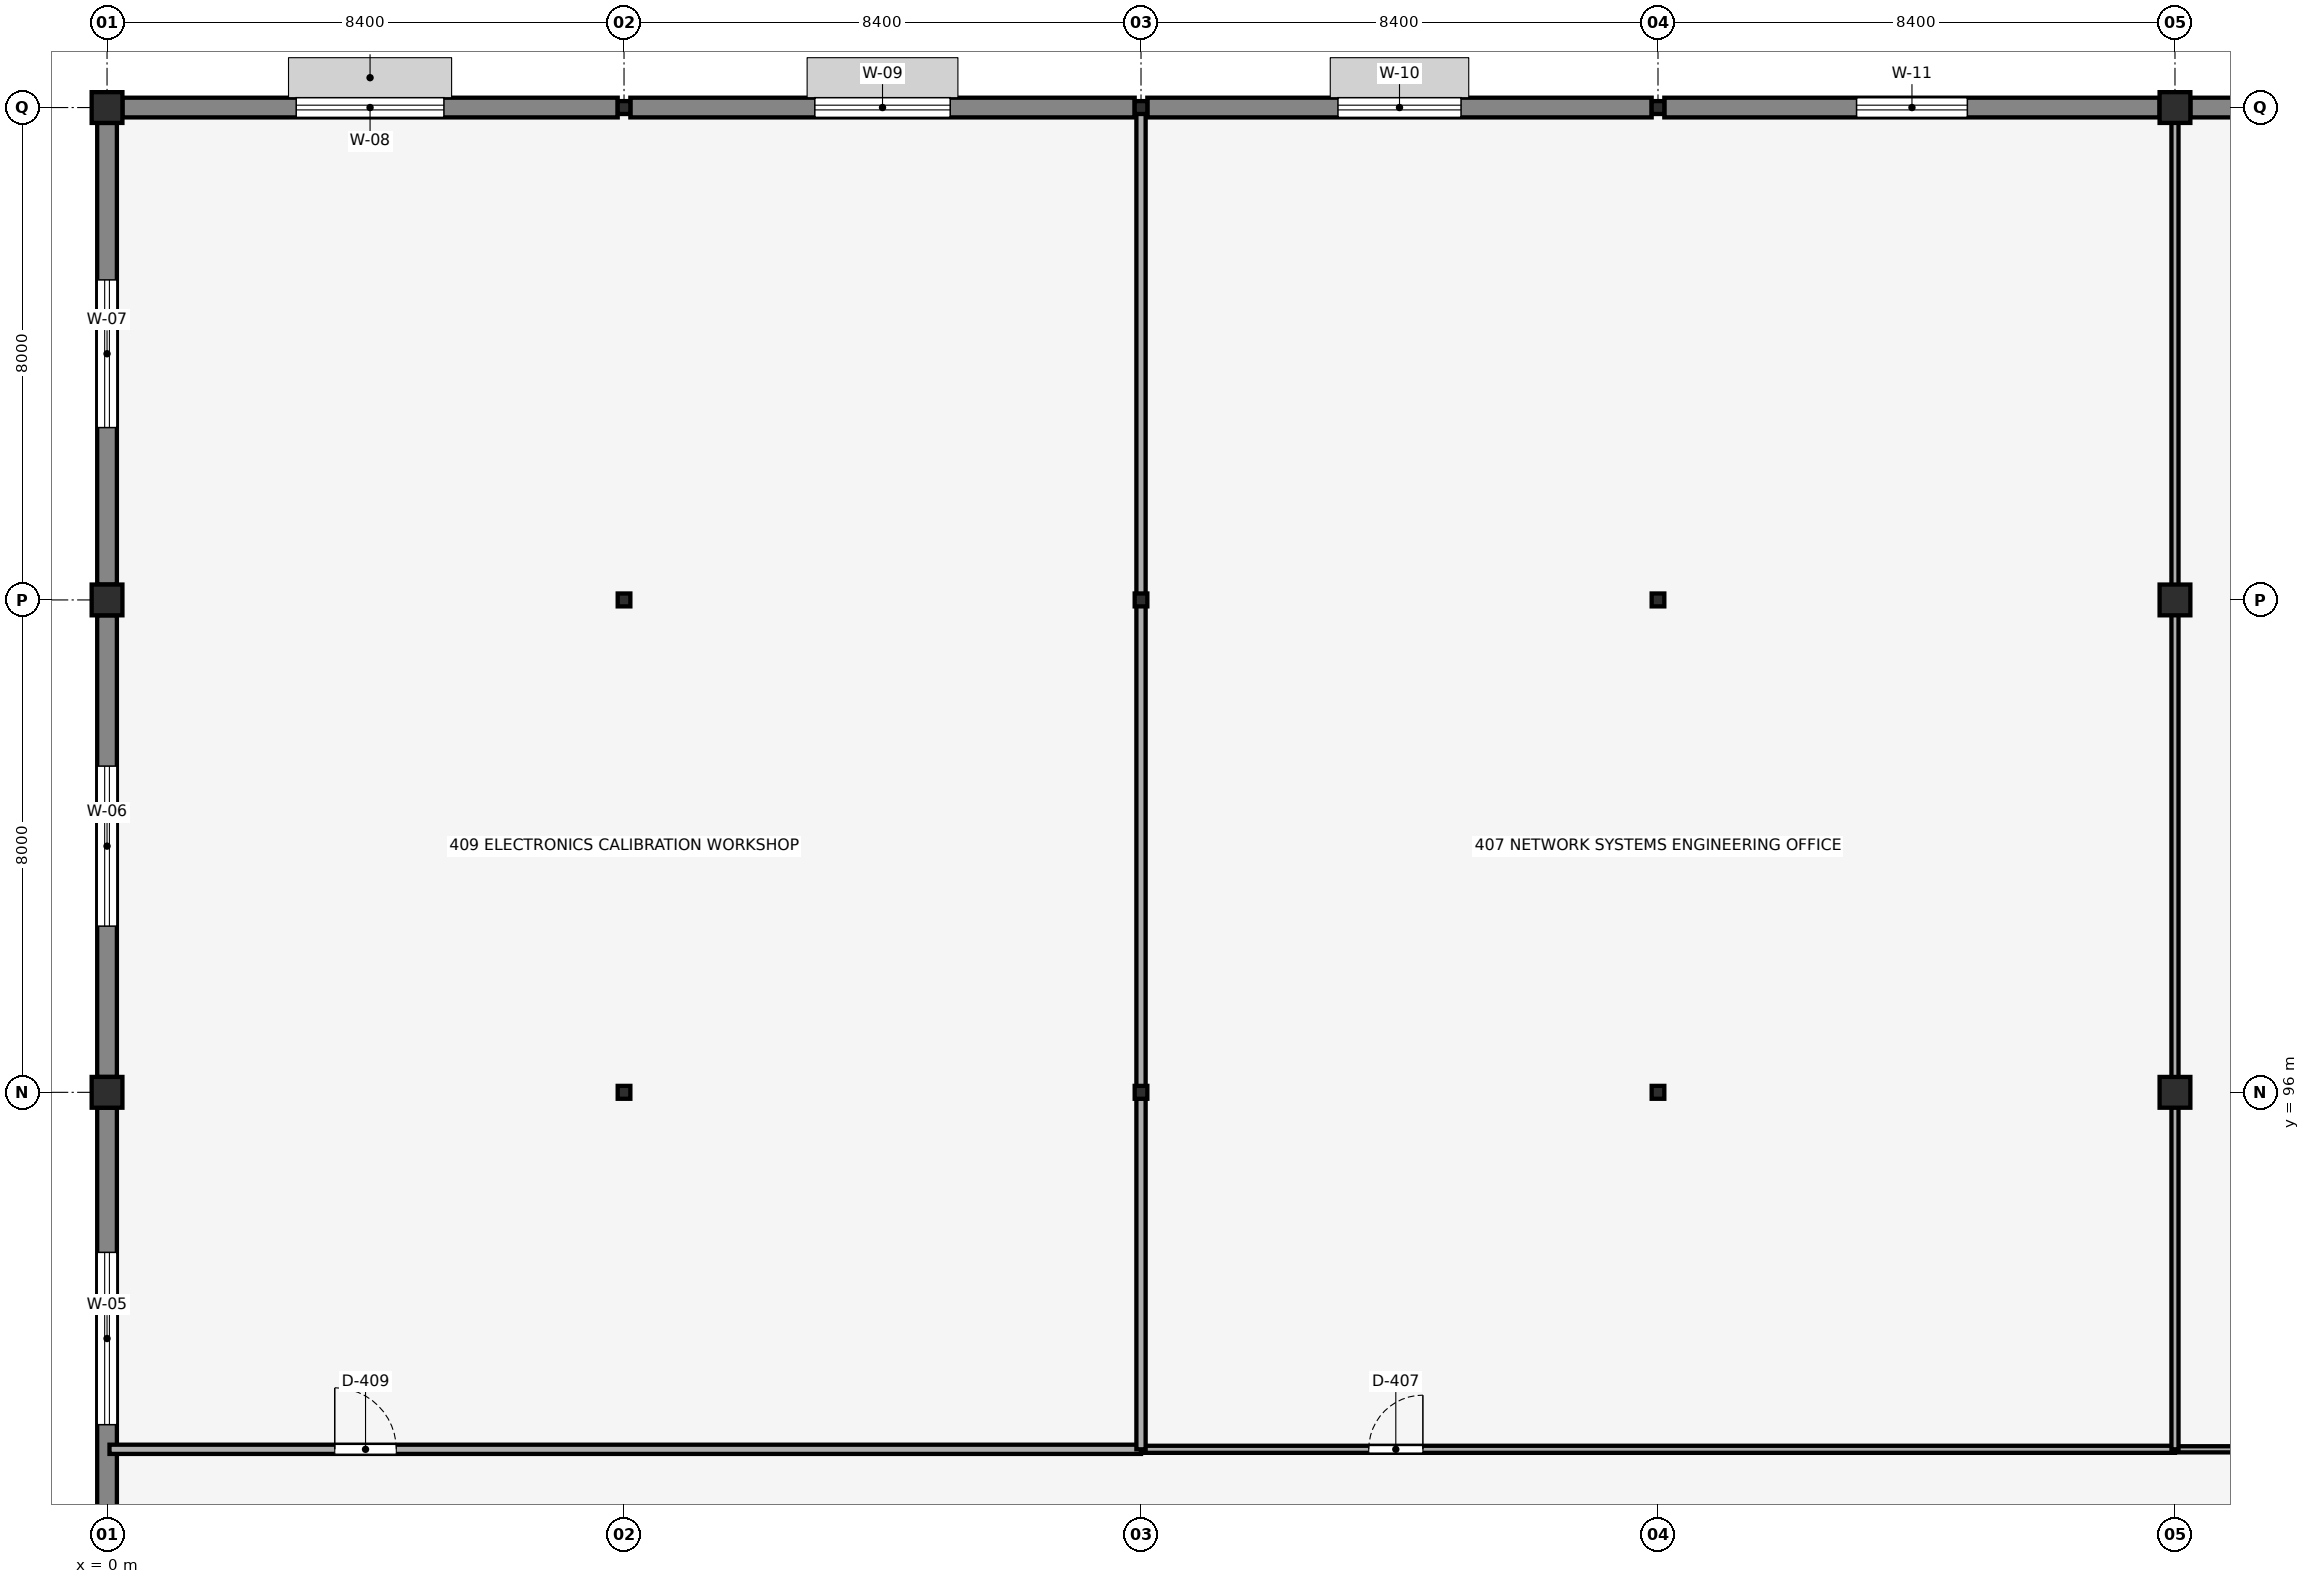
"""IFC4 building model, lengths in metres.
Left out: names, types, materials, properties, quantities, classifications, styles, units other than length and angle.
Written with IfcOpenShell. Run it as: python <this file> out.ifc"""

import sys

from ifc_helpers import new_model, si_unit, direction, frame, frame_2d, origin, origin_2d, place, context, subcontext, project, spatial, rectangle, i_section, extrude, element, fill, save


model = new_model("IFC4")
c1 = context("Model", 3, precision=1e-05, world=origin(), true_north=direction((0.0, 1.0)))
c2 = subcontext(c1, "Body", "Model", "MODEL_VIEW")
j1 = project(units=[si_unit("LENGTHUNIT", "METRE"), si_unit("PLANEANGLEUNIT", "RADIAN")], contexts=[c1])
p1 = place(None, origin())
s1 = spatial("IfcSite", under=j1, at=p1, CompositionType="ELEMENT")
p2 = place(p1, origin())
s2 = spatial("IfcBuilding", under=s1, at=p2, CompositionType="ELEMENT")
p3 = place(p2, frame((0.0, 0.0, 17.2)))
s3 = spatial("IfcBuildingStorey", under=s2, at=p3, CompositionType="ELEMENT", Elevation=17.2)
for number, where, z_axis, x_axis in (
    (1, (0.0, 96.0, 0.0), (0.0, 0.0, 1.0), (1.0, 0.0, 0.0)),
    (2, (0.0, 104.0, 0.0), (0.0, 0.0, 1.0), (1.0, 0.0, 0.0)),
    (3, (0.0, 112.0, 0.0), (0.0, 0.0, 1.0), (1.0, 0.0, 0.0)),
):
    element("IfcColumn", number, at=place(p3, frame(where, z_axis=z_axis, x_axis=x_axis)), inside=s3, PredefinedType="COLUMN", context=c2, shape_type="SweptSolid", body=[
        extrude(rectangle(XDim=0.5, YDim=0.5, at=origin_2d()), origin(), (0.0, 0.0, 1.0), 3.59),
    ])
for number, where, z_axis, x_axis in (
    (4, (8.4, 96.0, 0.0), (0.0, 0.0, 1.0), (1.0, 0.0, 0.0)),
    (5, (8.4, 104.0, 0.0), (0.0, 0.0, 1.0), (1.0, 0.0, 0.0)),
    (6, (8.4, 112.0, 0.0), (0.0, 0.0, 1.0), (1.0, 0.0, 0.0)),
    (7, (16.8, 96.0, 0.0), (0.0, 0.0, 1.0), (1.0, 0.0, 0.0)),
    (8, (16.8, 104.0, 0.0), (0.0, 0.0, 1.0), (1.0, 0.0, 0.0)),
    (9, (16.8, 112.0, 0.0), (0.0, 0.0, 1.0), (1.0, 0.0, 0.0)),
    (10, (25.2, 96.0, 0.0), (0.0, 0.0, 1.0), (1.0, 0.0, 0.0)),
    (11, (25.2, 104.0, 0.0), (0.0, 0.0, 1.0), (1.0, 0.0, 0.0)),
    (12, (25.2, 112.0, 0.0), (0.0, 0.0, 1.0), (1.0, 0.0, 0.0)),
):
    element("IfcColumn", number, at=place(p3, frame(where, z_axis=z_axis, x_axis=x_axis)), inside=s3, PredefinedType="COLUMN", context=c2, shape_type="SweptSolid", body=[
        extrude(i_section(OverallWidth=0.206, OverallDepth=0.21, WebThickness=0.01, FlangeThickness=0.014, FilletRadius=0.01, at=origin_2d()), origin(), (0.0, 0.0, 1.0), 3.59),
    ])
for number, where, z_axis, x_axis in (
    (13, (33.6, 96.0, 0.0), (0.0, 0.0, 1.0), (1.0, 0.0, 0.0)),
    (14, (33.6, 104.0, 0.0), (0.0, 0.0, 1.0), (1.0, 0.0, 0.0)),
    (15, (33.6, 112.0, 0.0), (0.0, 0.0, 1.0), (1.0, 0.0, 0.0)),
):
    element("IfcColumn", number, at=place(p3, frame(where, z_axis=z_axis, x_axis=x_axis)), inside=s3, PredefinedType="COLUMN", context=c2, shape_type="SweptSolid", body=[
        extrude(rectangle(XDim=0.5, YDim=0.5, at=origin_2d()), origin(), (0.0, 0.0, 1.0), 3.59),
    ])
p4 = place(p3, frame((0.0, 88.25, 0.0), z_axis=(0.0, 0.0, 1.0), x_axis=(0.0, 1.0, 0.0)))
e16 = element("IfcWall", 16, at=p4, inside=s3, PredefinedType="SOLIDWALL", context=c2, shape_type="SweptSolid", body=[
    extrude(rectangle(XDim=7.5, YDim=0.32, at=frame_2d((3.75, 0.0))), origin(), (0.0, 0.0, 1.0), 3.29),
])
p5 = place(p4, frame((2.35, 0.0, 0.9), z_axis=(0.0, 0.0, 1.0), x_axis=(1.0, 0.0, 0.0)))
e17 = element("IfcOpeningElement", 17, at=p5, cuts=e16, PredefinedType="OPENING", context=c2, shape_type="SweptSolid", body=[
    extrude(rectangle(XDim=2.8, YDim=1.6, at=frame_2d((1.4, 0.8))), frame((0.0, 0.17, 0.0), z_axis=(0.0, -1.0, 0.0), x_axis=(1.0, 0.0, 0.0)), (0.0, 0.0, 1.0), 0.34),
])
p6 = place(p3, frame((0.0, 96.25, 0.0), z_axis=(0.0, 0.0, 1.0), x_axis=(0.0, 1.0, 0.0)))
e18 = element("IfcWall", 18, at=p6, inside=s3, PredefinedType="SOLIDWALL", context=c2, shape_type="SweptSolid", body=[
    extrude(rectangle(XDim=7.5, YDim=0.32, at=frame_2d((3.75, 0.0))), origin(), (0.0, 0.0, 1.0), 3.29),
])
p7 = place(p6, frame((2.45, 0.0, 0.9), z_axis=(0.0, 0.0, 1.0), x_axis=(1.0, 0.0, 0.0)))
e19 = element("IfcOpeningElement", 19, at=p7, cuts=e18, PredefinedType="OPENING", context=c2, shape_type="SweptSolid", body=[
    extrude(rectangle(XDim=2.6, YDim=1.8, at=frame_2d((1.3, 0.9))), frame((0.0, 0.17, 0.0), z_axis=(0.0, -1.0, 0.0), x_axis=(1.0, 0.0, 0.0)), (0.0, 0.0, 1.0), 0.34),
])
p8 = place(p3, frame((0.0, 104.25, 0.0), z_axis=(0.0, 0.0, 1.0), x_axis=(0.0, 1.0, 0.0)))
e20 = element("IfcWall", 20, at=p8, inside=s3, PredefinedType="SOLIDWALL", context=c2, shape_type="SweptSolid", body=[
    extrude(rectangle(XDim=7.5, YDim=0.32, at=frame_2d((3.75, 0.0))), origin(), (0.0, 0.0, 1.0), 3.29),
])
p9 = place(p8, frame((2.55, 0.0, 0.9), z_axis=(0.0, 0.0, 1.0), x_axis=(1.0, 0.0, 0.0)))
e21 = element("IfcOpeningElement", 21, at=p9, cuts=e20, PredefinedType="OPENING", context=c2, shape_type="SweptSolid", body=[
    extrude(rectangle(XDim=2.4, YDim=1.75, at=frame_2d((1.2, 0.875))), frame((0.0, 0.17, 0.0), z_axis=(0.0, -1.0, 0.0), x_axis=(1.0, 0.0, 0.0)), (0.0, 0.0, 1.0), 0.34),
])
p10 = place(p3, frame((0.25, 112.0, 0.0), z_axis=(0.0, 0.0, 1.0), x_axis=(1.0, 0.0, 0.0)))
e22 = element("IfcWall", 22, at=p10, inside=s3, PredefinedType="SOLIDWALL", context=c2, shape_type="SweptSolid", body=[
    extrude(rectangle(XDim=8.047, YDim=0.32, at=frame_2d((4.023, 0.0))), origin(), (0.0, 0.0, 1.0), 3.33),
])
p11 = place(p10, frame((2.823, 0.0, 0.9), z_axis=(0.0, 0.0, 1.0), x_axis=(1.0, 0.0, 0.0)))
e23 = element("IfcOpeningElement", 23, at=p11, cuts=e22, PredefinedType="OPENING", context=c2, shape_type="SweptSolid", body=[
    extrude(rectangle(XDim=2.4, YDim=1.5, at=frame_2d((1.2, 0.75))), frame((0.0, 0.17, 0.0), z_axis=(0.0, -1.0, 0.0), x_axis=(1.0, 0.0, 0.0)), (0.0, 0.0, 1.0), 0.34),
])
p12 = place(p3, frame((8.503, 112.0, 0.0), z_axis=(0.0, 0.0, 1.0), x_axis=(1.0, 0.0, 0.0)))
e24 = element("IfcWall", 24, at=p12, inside=s3, PredefinedType="SOLIDWALL", context=c2, shape_type="SweptSolid", body=[
    extrude(rectangle(XDim=8.194, YDim=0.32, at=frame_2d((4.097, 0.0))), origin(), (0.0, 0.0, 1.0), 3.33),
])
p13 = place(p12, frame((2.997, 0.0, 0.9), z_axis=(0.0, 0.0, 1.0), x_axis=(1.0, 0.0, 0.0)))
e25 = element("IfcOpeningElement", 25, at=p13, cuts=e24, PredefinedType="OPENING", context=c2, shape_type="SweptSolid", body=[
    extrude(rectangle(XDim=2.2, YDim=1.5, at=frame_2d((1.1, 0.75))), frame((0.0, 0.17, 0.0), z_axis=(0.0, -1.0, 0.0), x_axis=(1.0, 0.0, 0.0)), (0.0, 0.0, 1.0), 0.34),
])
p14 = place(p3, frame((16.903, 112.0, 0.0), z_axis=(0.0, 0.0, 1.0), x_axis=(1.0, 0.0, 0.0)))
e26 = element("IfcWall", 26, at=p14, inside=s3, PredefinedType="SOLIDWALL", context=c2, shape_type="SweptSolid", body=[
    extrude(rectangle(XDim=8.194, YDim=0.32, at=frame_2d((4.097, 0.0))), origin(), (0.0, 0.0, 1.0), 3.33),
])
p15 = place(p14, frame((3.097, 0.0, 0.9), z_axis=(0.0, 0.0, 1.0), x_axis=(1.0, 0.0, 0.0)))
e27 = element("IfcOpeningElement", 27, at=p15, cuts=e26, PredefinedType="OPENING", context=c2, shape_type="SweptSolid", body=[
    extrude(rectangle(XDim=2.0, YDim=1.5, at=frame_2d((1.0, 0.75))), frame((0.0, 0.17, 0.0), z_axis=(0.0, -1.0, 0.0), x_axis=(1.0, 0.0, 0.0)), (0.0, 0.0, 1.0), 0.34),
])
p16 = place(p3, frame((25.303, 112.0, 0.0), z_axis=(0.0, 0.0, 1.0), x_axis=(1.0, 0.0, 0.0)))
e28 = element("IfcWall", 28, at=p16, inside=s3, PredefinedType="SOLIDWALL", context=c2, shape_type="SweptSolid", body=[
    extrude(rectangle(XDim=8.047, YDim=0.32, at=frame_2d((4.023, 0.0))), origin(), (0.0, 0.0, 1.0), 3.33),
])
p17 = place(p16, frame((3.124, 0.0, 0.9), z_axis=(0.0, 0.0, 1.0), x_axis=(1.0, 0.0, 0.0)))
e29 = element("IfcOpeningElement", 29, at=p17, cuts=e28, PredefinedType="OPENING", context=c2, shape_type="SweptSolid", body=[
    extrude(rectangle(XDim=1.8, YDim=1.45, at=frame_2d((0.9, 0.725))), frame((0.0, 0.17, 0.0), z_axis=(0.0, -1.0, 0.0), x_axis=(1.0, 0.0, 0.0)), (0.0, 0.0, 1.0), 0.34),
])
p18 = place(p3, frame((33.85, 112.0, 0.0), z_axis=(0.0, 0.0, 1.0), x_axis=(1.0, 0.0, 0.0)))
e30 = element("IfcWall", 30, at=p18, inside=s3, PredefinedType="SOLIDWALL", context=c2, shape_type="SweptSolid", body=[
    extrude(rectangle(XDim=8.047, YDim=0.32, at=frame_2d((4.023, 0.0))), origin(), (0.0, 0.0, 1.0), 3.33),
])
p19 = place(p18, frame((3.124, 0.0, 0.9), z_axis=(0.0, 0.0, 1.0), x_axis=(1.0, 0.0, 0.0)))
e31 = element("IfcOpeningElement", 31, at=p19, cuts=e30, PredefinedType="OPENING", context=c2, shape_type="SweptSolid", body=[
    extrude(rectangle(XDim=1.8, YDim=1.3, at=frame_2d((0.9, 0.65))), frame((0.0, 0.17, 0.0), z_axis=(0.0, -1.0, 0.0), x_axis=(1.0, 0.0, 0.0)), (0.0, 0.0, 1.0), 0.34),
])
p20 = place(p3, frame((0.04, 90.2, 0.0), z_axis=(0.0, 0.0, 1.0), x_axis=(1.0, 0.0, 0.0)))
e32 = element("IfcWall", 32, at=p20, inside=s3, PredefinedType="PARTITIONING", context=c2, shape_type="SweptSolid", body=[
    extrude(rectangle(XDim=16.76, YDim=0.15, at=frame_2d((8.38, 0.0))), origin(), (0.0, 0.0, 1.0), 3.137),
])
p21 = place(p20, frame((3.66, 0.0, 0.0), z_axis=(0.0, 0.0, 1.0), x_axis=(1.0, 0.0, 0.0)))
e33 = element("IfcOpeningElement", 33, at=p21, cuts=e32, PredefinedType="OPENING", context=c2, shape_type="SweptSolid", body=[
    extrude(rectangle(XDim=1.0, YDim=2.15, at=frame_2d((0.5, 1.075))), frame((0.0, 0.085, 0.0), z_axis=(0.0, -1.0, 0.0), x_axis=(1.0, 0.0, 0.0)), (0.0, 0.0, 1.0), 0.17),
])
p22 = place(p3, frame((16.8, 90.2, 0.0), z_axis=(0.0, 0.0, 1.0), x_axis=(1.0, 0.0, 0.0)))
e34 = element("IfcWall", 34, at=p22, inside=s3, PredefinedType="PARTITIONING", context=c2, shape_type="SweptSolid", body=[
    extrude(rectangle(XDim=16.8, YDim=0.115, at=frame_2d((8.4, 0.0))), origin(), (0.0, 0.0, 1.0), 3.137),
])
p23 = place(p22, frame((3.7, 0.0, 0.0), z_axis=(0.0, 0.0, 1.0), x_axis=(1.0, 0.0, 0.0)))
e35 = element("IfcOpeningElement", 35, at=p23, cuts=e34, PredefinedType="OPENING", context=c2, shape_type="SweptSolid", body=[
    extrude(rectangle(XDim=0.88, YDim=2.1, at=frame_2d((0.44, 1.05))), frame((0.0, 0.067, 0.0), z_axis=(0.0, -1.0, 0.0), x_axis=(1.0, 0.0, 0.0)), (0.0, 0.0, 1.0), 0.135),
])
p24 = place(p3, frame((33.6, 90.2, 0.0), z_axis=(0.0, 0.0, 1.0), x_axis=(1.0, 0.0, 0.0)))
e36 = element("IfcWall", 36, at=p24, inside=s3, PredefinedType="PARTITIONING", context=c2, shape_type="SweptSolid", body=[
    extrude(rectangle(XDim=8.4, YDim=0.1, at=frame_2d((4.2, 0.0))), origin(), (0.0, 0.0, 1.0), 3.59),
])
p25 = place(p24, frame((3.7, 0.0, 0.0), z_axis=(0.0, 0.0, 1.0), x_axis=(1.0, 0.0, 0.0)))
e37 = element("IfcOpeningElement", 37, at=p25, cuts=e36, PredefinedType="OPENING", context=c2, shape_type="SweptSolid", body=[
    extrude(rectangle(XDim=0.98, YDim=2.15, at=frame_2d((0.49, 1.075))), frame((0.0, 0.06, 0.0), z_axis=(0.0, -1.0, 0.0), x_axis=(1.0, 0.0, 0.0)), (0.0, 0.0, 1.0), 0.12),
])
p26 = place(p3, frame((16.8, 90.2, 0.0), z_axis=(0.0, 0.0, 1.0), x_axis=(0.0, 1.0, 0.0)))
e38 = element("IfcWall", 38, at=p26, inside=s3, PredefinedType="PARTITIONING", context=c2, shape_type="SweptSolid", body=[
    extrude(rectangle(XDim=5.705, YDim=0.15, at=frame_2d((2.853, 0.0))), origin(), (0.0, 0.0, 1.0), 3.137),
])
for number, where, z_axis, x_axis in (
    (39, (16.8, 96.095, 0.0), (0.0, 0.0, 1.0), (0.0, 1.0, 0.0)),
    (40, (16.8, 104.095, 0.0), (0.0, 0.0, 1.0), (0.0, 1.0, 0.0)),
):
    element("IfcWall", number, at=place(p3, frame(where, z_axis=z_axis, x_axis=x_axis)), inside=s3, PredefinedType="PARTITIONING", context=c2, shape_type="SweptSolid", body=[
        extrude(rectangle(XDim=7.811, YDim=0.15, at=frame_2d((3.905, 0.0))), origin(), (0.0, 0.0, 1.0), 3.137),
    ])
p27 = place(p3, frame((33.6, 90.2, 0.0), z_axis=(0.0, 0.0, 1.0), x_axis=(0.0, 1.0, 0.0)))
e41 = element("IfcWall", 41, at=p27, inside=s3, PredefinedType="PARTITIONING", context=c2, shape_type="SweptSolid", body=[
    extrude(rectangle(XDim=5.56, YDim=0.115, at=frame_2d((2.78, 0.0))), origin(), (0.0, 0.0, 1.0), 3.137),
])
for number, where, z_axis, x_axis in (
    (42, (33.6, 96.24, 0.0), (0.0, 0.0, 1.0), (0.0, 1.0, 0.0)),
    (43, (33.6, 104.24, 0.0), (0.0, 0.0, 1.0), (0.0, 1.0, 0.0)),
):
    element("IfcWall", number, at=place(p3, frame(where, z_axis=z_axis, x_axis=x_axis)), inside=s3, PredefinedType="PARTITIONING", context=c2, shape_type="SweptSolid", body=[
        extrude(rectangle(XDim=7.52, YDim=0.115, at=frame_2d((3.76, 0.0))), origin(), (0.0, 0.0, 1.0), 3.137),
    ])
p28 = place(p5, origin())
e44 = element("IfcWindow", 44, at=p28, inside=s3, PartitioningType="DOUBLE_PANEL_VERTICAL", PredefinedType="WINDOW", context=c2, shape_type="SweptSolid", body=[
    extrude(rectangle(XDim=2.8, YDim=1.6, at=frame_2d((1.4, 0.8))), frame((0.0, 0.03, 0.0), z_axis=(0.0, -1.0, 0.0), x_axis=(1.0, 0.0, 0.0)), (0.0, 0.0, 1.0), 0.06),
])
fill(e17, e44)
p29 = place(p7, origin())
e45 = element("IfcWindow", 45, at=p29, inside=s3, PartitioningType="DOUBLE_PANEL_VERTICAL", PredefinedType="WINDOW", context=c2, shape_type="SweptSolid", body=[
    extrude(rectangle(XDim=2.6, YDim=1.8, at=frame_2d((1.3, 0.9))), frame((0.0, 0.03, 0.0), z_axis=(0.0, -1.0, 0.0), x_axis=(1.0, 0.0, 0.0)), (0.0, 0.0, 1.0), 0.06),
])
fill(e19, e45)
p30 = place(p9, origin())
e46 = element("IfcWindow", 46, at=p30, inside=s3, PartitioningType="DOUBLE_PANEL_VERTICAL", PredefinedType="WINDOW", context=c2, shape_type="SweptSolid", body=[
    extrude(rectangle(XDim=2.4, YDim=1.75, at=frame_2d((1.2, 0.875))), frame((0.0, 0.03, 0.0), z_axis=(0.0, -1.0, 0.0), x_axis=(1.0, 0.0, 0.0)), (0.0, 0.0, 1.0), 0.06),
])
fill(e21, e46)
p31 = place(p11, origin())
e47 = element("IfcWindow", 47, at=p31, inside=s3, PartitioningType="DOUBLE_PANEL_VERTICAL", PredefinedType="WINDOW", context=c2, shape_type="SweptSolid", body=[
    extrude(rectangle(XDim=2.4, YDim=1.5, at=frame_2d((1.2, 0.75))), frame((0.0, 0.03, 0.0), z_axis=(0.0, -1.0, 0.0), x_axis=(1.0, 0.0, 0.0)), (0.0, 0.0, 1.0), 0.06),
])
fill(e23, e47)
p32 = place(p13, origin())
e48 = element("IfcWindow", 48, at=p32, inside=s3, PartitioningType="DOUBLE_PANEL_VERTICAL", PredefinedType="WINDOW", context=c2, shape_type="SweptSolid", body=[
    extrude(rectangle(XDim=2.2, YDim=1.5, at=frame_2d((1.1, 0.75))), frame((0.0, 0.03, 0.0), z_axis=(0.0, -1.0, 0.0), x_axis=(1.0, 0.0, 0.0)), (0.0, 0.0, 1.0), 0.06),
])
fill(e25, e48)
p33 = place(p15, origin())
e49 = element("IfcWindow", 49, at=p33, inside=s3, PartitioningType="DOUBLE_PANEL_VERTICAL", PredefinedType="WINDOW", context=c2, shape_type="SweptSolid", body=[
    extrude(rectangle(XDim=2.0, YDim=1.5, at=frame_2d((1.0, 0.75))), frame((0.0, 0.03, 0.0), z_axis=(0.0, -1.0, 0.0), x_axis=(1.0, 0.0, 0.0)), (0.0, 0.0, 1.0), 0.06),
])
fill(e27, e49)
p34 = place(p17, origin())
e50 = element("IfcWindow", 50, at=p34, inside=s3, PartitioningType="DOUBLE_PANEL_VERTICAL", PredefinedType="WINDOW", context=c2, shape_type="SweptSolid", body=[
    extrude(rectangle(XDim=1.8, YDim=1.45, at=frame_2d((0.9, 0.725))), frame((0.0, 0.03, 0.0), z_axis=(0.0, -1.0, 0.0), x_axis=(1.0, 0.0, 0.0)), (0.0, 0.0, 1.0), 0.06),
])
fill(e29, e50)
p35 = place(p21, origin())
e51 = element("IfcDoor", 51, at=p35, inside=s3, OperationType="SINGLE_SWING_LEFT", PredefinedType="DOOR", context=c2, shape_type="SweptSolid", body=[
    extrude(rectangle(XDim=1.0, YDim=2.15, at=frame_2d((0.5, 1.075))), frame((0.0, 0.025, 0.0), z_axis=(0.0, -1.0, 0.0), x_axis=(1.0, 0.0, 0.0)), (0.0, 0.0, 1.0), 0.05),
])
fill(e33, e51)
p36 = place(p23, origin())
e52 = element("IfcDoor", 52, at=p36, inside=s3, OperationType="SINGLE_SWING_RIGHT", PredefinedType="DOOR", context=c2, shape_type="SweptSolid", body=[
    extrude(rectangle(XDim=0.88, YDim=2.1, at=frame_2d((0.44, 1.05))), frame((0.0, 0.025, 0.0), z_axis=(0.0, -1.0, 0.0), x_axis=(1.0, 0.0, 0.0)), (0.0, 0.0, 1.0), 0.05),
])
fill(e35, e52)
save(model, sys.argv[1])
